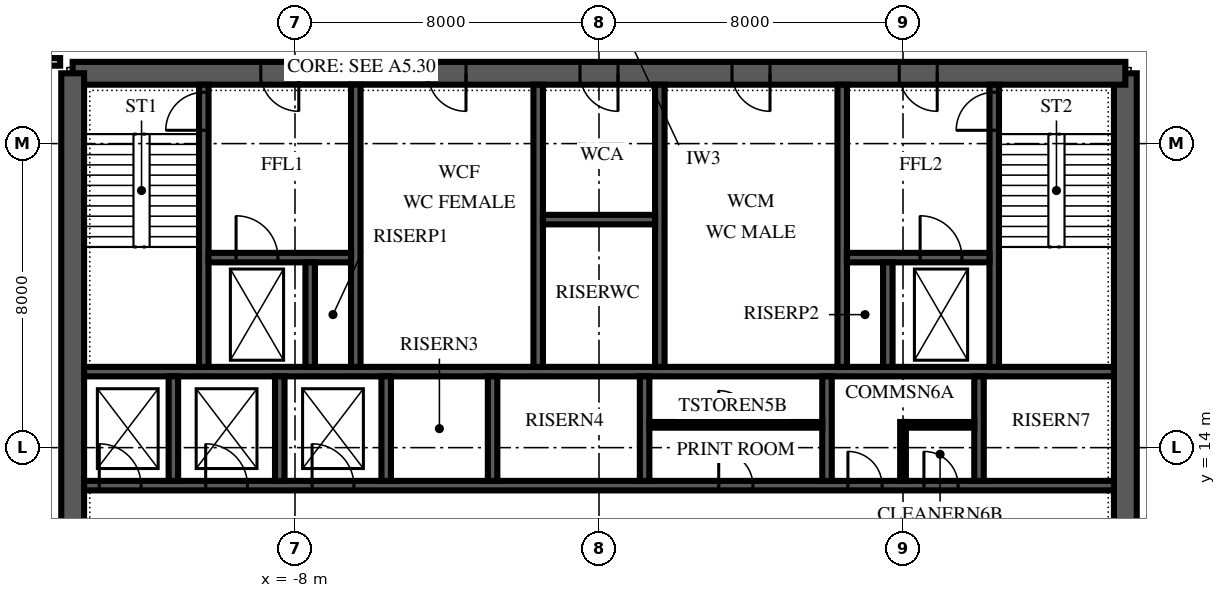
"""IFC4 building model, lengths in metres.
Left out: names, types, materials, properties, quantities, classifications, styles, units other than length and angle.
Written with IfcOpenShell. Run it as: python <this file> out.ifc"""

import sys

from ifc_helpers import new_model, si_unit, direction, frame, frame_2d, origin, place, context, subcontext, project, spatial, polyline, rectangle, outline, extrude, element, fill, save


model = new_model("IFC4")
c1 = context("Model", 3, precision=1e-05, world=origin(), true_north=direction((0.0, 1.0)))
c2 = subcontext(c1, "Body", "Model", "MODEL_VIEW")
j1 = project(units=[si_unit("LENGTHUNIT", "METRE"), si_unit("PLANEANGLEUNIT", "RADIAN")], contexts=[c1])
p1 = place(None, origin())
s1 = spatial("IfcSite", under=j1, at=p1, CompositionType="ELEMENT")
p2 = place(p1, origin())
s2 = spatial("IfcBuilding", under=s1, at=p2, CompositionType="ELEMENT")
p3 = place(p2, frame((0.0, 0.0, 214.0)))
s3 = spatial("IfcBuildingStorey", under=s2, at=p3, CompositionType="ELEMENT", Elevation=214.0)
p4 = place(p3, frame((13.85, 6.15, 0.0), z_axis=(0.0, 0.0, 1.0), x_axis=(0.0, 1.0, 0.0)))
e1 = element("IfcWall", 1, at=p4, inside=s3, PredefinedType="SHEAR", context=c2, shape_type="SweptSolid", body=[
    extrude(outline(polyline([(0.0, -0.3), (17.7, -0.3), (17.7, 0.0), (17.4, 0.0), (17.4, 0.3), (0.3, 0.3), (0.3, 0.0), (0.0, 0.0), (0.0, -0.3)])), origin(), (0.0, 0.0, 1.0), 4.0),
])
p5 = place(p4, frame((4.15, 0.0, 0.0)))
e2 = element("IfcOpeningElement", 2, at=p5, cuts=e1, PredefinedType="OPENING", context=c2, shape_type="SweptSolid", body=[
    extrude(rectangle(XDim=1.8, YDim=2.4, at=frame_2d((0.9, 1.2))), frame((0.0, 0.315, 0.0), z_axis=(0.0, -1.0, 0.0), x_axis=(1.0, 0.0, 0.0)), (0.0, 0.0, 1.0), 0.63),
])
p6 = place(p3, frame((13.85, 23.85, 0.0), z_axis=(0.0, 0.0, 1.0), x_axis=(-1.0, 0.0, 0.0)))
e3 = element("IfcWall", 3, at=p6, inside=s3, PredefinedType="SHEAR", context=c2, shape_type="SweptSolid", body=[
    extrude(rectangle(XDim=27.7, YDim=0.6, at=frame_2d((13.85, 0.0))), origin(), (0.0, 0.0, 1.0), 4.0),
])
p7 = place(p6, frame((21.75, 0.0, 0.0)))
e4 = element("IfcOpeningElement", 4, at=p7, cuts=e3, PredefinedType="OPENING", context=c2, shape_type="SweptSolid", body=[
    extrude(rectangle(XDim=1.0, YDim=2.1, at=frame_2d((0.5, 1.05))), frame((0.0, 0.315, 0.0), z_axis=(0.0, -1.0, 0.0), x_axis=(1.0, 0.0, 0.0)), (0.0, 0.0, 1.0), 0.63),
])
p8 = place(p6, frame((4.95, 0.0, 0.0)))
e5 = element("IfcOpeningElement", 5, at=p8, cuts=e3, PredefinedType="OPENING", context=c2, shape_type="SweptSolid", body=[
    extrude(rectangle(XDim=1.0, YDim=2.1, at=frame_2d((0.5, 1.05))), frame((0.0, 0.315, 0.0), z_axis=(0.0, -1.0, 0.0), x_axis=(1.0, 0.0, 0.0)), (0.0, 0.0, 1.0), 0.63),
])
p9 = place(p6, frame((17.35, 0.0, 0.0)))
e6 = element("IfcOpeningElement", 6, at=p9, cuts=e3, PredefinedType="OPENING", context=c2, shape_type="SweptSolid", body=[
    extrude(rectangle(XDim=1.0, YDim=2.1, at=frame_2d((0.5, 1.05))), frame((0.0, 0.315, 0.0), z_axis=(0.0, -1.0, 0.0), x_axis=(1.0, 0.0, 0.0)), (0.0, 0.0, 1.0), 0.63),
])
p10 = place(p6, frame((13.35, 0.0, 0.0)))
e7 = element("IfcOpeningElement", 7, at=p10, cuts=e3, PredefinedType="OPENING", context=c2, shape_type="SweptSolid", body=[
    extrude(rectangle(XDim=1.0, YDim=2.1, at=frame_2d((0.5, 1.05))), frame((0.0, 0.315, 0.0), z_axis=(0.0, -1.0, 0.0), x_axis=(1.0, 0.0, 0.0)), (0.0, 0.0, 1.0), 0.63),
])
p11 = place(p6, frame((9.35, 0.0, 0.0)))
e8 = element("IfcOpeningElement", 8, at=p11, cuts=e3, PredefinedType="OPENING", context=c2, shape_type="SweptSolid", body=[
    extrude(rectangle(XDim=1.0, YDim=2.1, at=frame_2d((0.5, 1.05))), frame((0.0, 0.315, 0.0), z_axis=(0.0, -1.0, 0.0), x_axis=(1.0, 0.0, 0.0)), (0.0, 0.0, 1.0), 0.63),
])
p12 = place(p3, frame((-13.85, 23.85, 0.0), z_axis=(0.0, 0.0, 1.0), x_axis=(0.0, -1.0, 0.0)))
e9 = element("IfcWall", 9, at=p12, inside=s3, PredefinedType="SHEAR", context=c2, shape_type="SweptSolid", body=[
    extrude(outline(polyline([(0.0, -0.3), (17.7, -0.3), (17.7, 0.0), (17.4, 0.0), (17.4, 0.3), (0.3, 0.3), (0.3, 0.0), (0.0, 0.0), (0.0, -0.3)])), origin(), (0.0, 0.0, 1.0), 4.0),
])
p13 = place(p12, frame((11.75, 0.0, 0.0)))
e10 = element("IfcOpeningElement", 10, at=p13, cuts=e9, PredefinedType="OPENING", context=c2, shape_type="SweptSolid", body=[
    extrude(rectangle(XDim=1.8, YDim=2.4, at=frame_2d((0.9, 1.2))), frame((0.0, 0.315, 0.0), z_axis=(0.0, -1.0, 0.0), x_axis=(1.0, 0.0, 0.0)), (0.0, 0.0, 1.0), 0.63),
])
p14 = place(p3, frame((-13.55, 13.0, 0.0), z_axis=(0.0, 0.0, 1.0), x_axis=(1.0, 0.0, 0.0)))
e11 = element("IfcWall", 11, at=p14, inside=s3, PredefinedType="SHEAR", context=c2, shape_type="SweptSolid", body=[
    extrude(rectangle(XDim=27.1, YDim=0.25, at=frame_2d((13.55, 0.0))), origin(), (0.0, 0.0, 1.0), 4.0),
])
p15 = place(p14, frame((0.4, 0.0, 0.0)))
e12 = element("IfcOpeningElement", 12, at=p15, cuts=e11, PredefinedType="OPENING", context=c2, shape_type="SweptSolid", body=[
    extrude(rectangle(XDim=1.1, YDim=2.1, at=frame_2d((0.55, 1.05))), frame((0.0, 0.14, 0.0), z_axis=(0.0, -1.0, 0.0), x_axis=(1.0, 0.0, 0.0)), (0.0, 0.0, 1.0), 0.28),
])
p16 = place(p14, frame((3.2, 0.0, 0.0)))
e13 = element("IfcOpeningElement", 13, at=p16, cuts=e11, PredefinedType="OPENING", context=c2, shape_type="SweptSolid", body=[
    extrude(rectangle(XDim=1.1, YDim=2.1, at=frame_2d((0.55, 1.05))), frame((0.0, 0.14, 0.0), z_axis=(0.0, -1.0, 0.0), x_axis=(1.0, 0.0, 0.0)), (0.0, 0.0, 1.0), 0.28),
])
p17 = place(p14, frame((6.0, 0.0, 0.0)))
e14 = element("IfcOpeningElement", 14, at=p17, cuts=e11, PredefinedType="OPENING", context=c2, shape_type="SweptSolid", body=[
    extrude(rectangle(XDim=1.1, YDim=2.1, at=frame_2d((0.55, 1.05))), frame((0.0, 0.14, 0.0), z_axis=(0.0, -1.0, 0.0), x_axis=(1.0, 0.0, 0.0)), (0.0, 0.0, 1.0), 0.28),
])
p18 = place(p14, frame((16.7, 0.0, 0.0)))
e15 = element("IfcOpeningElement", 15, at=p18, cuts=e11, PredefinedType="OPENING", context=c2, shape_type="SweptSolid", body=[
    extrude(rectangle(XDim=0.9, YDim=2.1, at=frame_2d((0.45, 1.05))), frame((0.0, 0.14, 0.0), z_axis=(0.0, -1.0, 0.0), x_axis=(1.0, 0.0, 0.0)), (0.0, 0.0, 1.0), 0.28),
])
p19 = place(p14, frame((20.1, 0.0, 0.0)))
e16 = element("IfcOpeningElement", 16, at=p19, cuts=e11, PredefinedType="OPENING", context=c2, shape_type="SweptSolid", body=[
    extrude(rectangle(XDim=0.9, YDim=2.1, at=frame_2d((0.45, 1.05))), frame((0.0, 0.14, 0.0), z_axis=(0.0, -1.0, 0.0), x_axis=(1.0, 0.0, 0.0)), (0.0, 0.0, 1.0), 0.28),
])
p20 = place(p14, frame((22.1, 0.0, 0.0)))
e17 = element("IfcOpeningElement", 17, at=p20, cuts=e11, PredefinedType="OPENING", context=c2, shape_type="SweptSolid", body=[
    extrude(rectangle(XDim=0.9, YDim=2.1, at=frame_2d((0.45, 1.05))), frame((0.0, 0.14, 0.0), z_axis=(0.0, -1.0, 0.0), x_axis=(1.0, 0.0, 0.0)), (0.0, 0.0, 1.0), 0.28),
])
p21 = place(p3, frame((-13.55, 16.0, 0.0), z_axis=(0.0, 0.0, 1.0), x_axis=(1.0, 0.0, 0.0)))
e18 = element("IfcWall", 18, at=p21, inside=s3, PredefinedType="SHEAR", context=c2, shape_type="SweptSolid", body=[
    extrude(rectangle(XDim=27.1, YDim=0.25, at=frame_2d((13.55, 0.0))), origin(), (0.0, 0.0, 1.0), 4.0),
])
for number, where, z_axis, x_axis in (
    (19, (-11.2, 13.125, 0.0), (0.0, 0.0, 1.0), (0.0, 1.0, 0.0)),
    (20, (-8.4, 13.125, 0.0), (0.0, 0.0, 1.0), (0.0, 1.0, 0.0)),
    (21, (-5.6, 13.125, 0.0), (0.0, 0.0, 1.0), (0.0, 1.0, 0.0)),
    (22, (-2.8, 13.125, 0.0), (0.0, 0.0, 1.0), (0.0, 1.0, 0.0)),
    (23, (1.2, 13.125, 0.0), (0.0, 0.0, 1.0), (0.0, 1.0, 0.0)),
    (24, (6.0, 13.125, 0.0), (0.0, 0.0, 1.0), (0.0, 1.0, 0.0)),
    (25, (10.0, 13.125, 0.0), (0.0, 0.0, 1.0), (0.0, 1.0, 0.0)),
):
    element("IfcWall", number, at=place(p3, frame(where, z_axis=z_axis, x_axis=x_axis)), inside=s3, PredefinedType="SHEAR", context=c2, shape_type="SweptSolid", body=[
        extrude(rectangle(XDim=2.75, YDim=0.25, at=frame_2d((1.375, 0.0))), origin(), (0.0, 0.0, 1.0), 4.0),
    ])
p22 = place(p3, frame((-10.4, 16.125, 0.0), z_axis=(0.0, 0.0, 1.0), x_axis=(0.0, 1.0, 0.0)))
e26 = element("IfcWall", 26, at=p22, inside=s3, PredefinedType="SHEAR", context=c2, shape_type="SweptSolid", body=[
    extrude(rectangle(XDim=7.425, YDim=0.25, at=frame_2d((3.712, 0.0))), origin(), (0.0, 0.0, 1.0), 4.0),
])
p23 = place(p22, frame((6.225, 0.0, 0.0)))
e27 = element("IfcOpeningElement", 27, at=p23, cuts=e26, PredefinedType="OPENING", context=c2, shape_type="SweptSolid", body=[
    extrude(rectangle(XDim=1.0, YDim=2.1, at=frame_2d((0.5, 1.05))), frame((0.0, 0.14, 0.0), z_axis=(0.0, -1.0, 0.0), x_axis=(1.0, 0.0, 0.0)), (0.0, 0.0, 1.0), 0.28),
])
for number, where, z_axis, x_axis in (
    (28, (-6.4, 16.125, 0.0), (0.0, 0.0, 1.0), (0.0, 1.0, 0.0)),
    (29, (-1.6, 16.125, 0.0), (0.0, 0.0, 1.0), (0.0, 1.0, 0.0)),
    (30, (1.6, 16.125, 0.0), (0.0, 0.0, 1.0), (0.0, 1.0, 0.0)),
    (31, (6.4, 16.125, 0.0), (0.0, 0.0, 1.0), (0.0, 1.0, 0.0)),
):
    element("IfcWall", number, at=place(p3, frame(where, z_axis=z_axis, x_axis=x_axis)), inside=s3, PredefinedType="SHEAR", context=c2, shape_type="SweptSolid", body=[
        extrude(rectangle(XDim=7.425, YDim=0.25, at=frame_2d((3.712, 0.0))), origin(), (0.0, 0.0, 1.0), 4.0),
    ])
p24 = place(p3, frame((10.4, 16.125, 0.0), z_axis=(0.0, 0.0, 1.0), x_axis=(0.0, 1.0, 0.0)))
e32 = element("IfcWall", 32, at=p24, inside=s3, PredefinedType="SHEAR", context=c2, shape_type="SweptSolid", body=[
    extrude(rectangle(XDim=7.425, YDim=0.25, at=frame_2d((3.712, 0.0))), origin(), (0.0, 0.0, 1.0), 4.0),
])
p25 = place(p24, frame((6.225, 0.0, 0.0)))
e33 = element("IfcOpeningElement", 33, at=p25, cuts=e32, PredefinedType="OPENING", context=c2, shape_type="SweptSolid", body=[
    extrude(rectangle(XDim=1.0, YDim=2.1, at=frame_2d((0.5, 1.05))), frame((0.0, 0.14, 0.0), z_axis=(0.0, -1.0, 0.0), x_axis=(1.0, 0.0, 0.0)), (0.0, 0.0, 1.0), 0.28),
])
p26 = place(p3, frame((-10.275, 19.0, 0.0), z_axis=(0.0, 0.0, 1.0), x_axis=(1.0, 0.0, 0.0)))
e34 = element("IfcWall", 34, at=p26, inside=s3, PredefinedType="SHEAR", context=c2, shape_type="SweptSolid", body=[
    extrude(rectangle(XDim=3.75, YDim=0.25, at=frame_2d((1.875, 0.0))), origin(), (0.0, 0.0, 1.0), 4.0),
])
p27 = place(p26, frame((0.725, 0.0, 0.0)))
e35 = element("IfcOpeningElement", 35, at=p27, cuts=e34, PredefinedType="OPENING", context=c2, shape_type="SweptSolid", body=[
    extrude(rectangle(XDim=1.1, YDim=2.1, at=frame_2d((0.55, 1.05))), frame((0.0, 0.14, 0.0), z_axis=(0.0, -1.0, 0.0), x_axis=(1.0, 0.0, 0.0)), (0.0, 0.0, 1.0), 0.28),
])
p28 = place(p3, frame((6.525, 19.0, 0.0), z_axis=(0.0, 0.0, 1.0), x_axis=(1.0, 0.0, 0.0)))
e36 = element("IfcWall", 36, at=p28, inside=s3, PredefinedType="SHEAR", context=c2, shape_type="SweptSolid", body=[
    extrude(rectangle(XDim=3.75, YDim=0.25, at=frame_2d((1.875, 0.0))), origin(), (0.0, 0.0, 1.0), 4.0),
])
p29 = place(p28, frame((1.925, 0.0, 0.0)))
e37 = element("IfcOpeningElement", 37, at=p29, cuts=e36, PredefinedType="OPENING", context=c2, shape_type="SweptSolid", body=[
    extrude(rectangle(XDim=1.1, YDim=2.1, at=frame_2d((0.55, 1.05))), frame((0.0, 0.14, 0.0), z_axis=(0.0, -1.0, 0.0), x_axis=(1.0, 0.0, 0.0)), (0.0, 0.0, 1.0), 0.28),
])
for number, where, z_axis, x_axis in (
    (38, (-7.6, 16.125, 0.0), (0.0, 0.0, 1.0), (0.0, 1.0, 0.0)),
    (39, (7.6, 16.125, 0.0), (0.0, 0.0, 1.0), (0.0, 1.0, 0.0)),
):
    element("IfcWall", number, at=place(p3, frame(where, z_axis=z_axis, x_axis=x_axis)), inside=s3, PredefinedType="SHEAR", context=c2, shape_type="SweptSolid", body=[
        extrude(rectangle(XDim=2.75, YDim=0.25, at=frame_2d((1.375, 0.0))), origin(), (0.0, 0.0, 1.0), 4.0),
    ])
p30 = place(p3, frame((-1.475, 20.0, 0.0), z_axis=(0.0, 0.0, 1.0), x_axis=(1.0, 0.0, 0.0)))
e40 = element("IfcWall", 40, at=p30, inside=s3, PredefinedType="SHEAR", context=c2, shape_type="SweptSolid", body=[
    extrude(rectangle(XDim=2.95, YDim=0.25, at=frame_2d((1.475, 0.0))), origin(), (0.0, 0.0, 1.0), 4.0),
])
p31 = place(p3, frame((1.325, 14.6, 0.0), z_axis=(0.0, 0.0, 1.0), x_axis=(1.0, 0.0, 0.0)))
e41 = element("IfcWall", 41, at=p31, inside=s3, PredefinedType="PARTITIONING", context=c2, shape_type="SweptSolid", body=[
    extrude(rectangle(XDim=4.55, YDim=0.15, at=frame_2d((2.275, 0.0))), origin(), (0.0, 0.0, 1.0), 3.85),
])
p32 = place(p31, frame((1.825, 0.0, 0.0)))
e42 = element("IfcOpeningElement", 42, at=p32, cuts=e41, PredefinedType="OPENING", context=c2, shape_type="SweptSolid", body=[
    extrude(rectangle(XDim=0.9, YDim=2.1, at=frame_2d((0.45, 1.05))), frame((0.0, 0.09, 0.0), z_axis=(0.0, -1.0, 0.0), x_axis=(1.0, 0.0, 0.0)), (0.0, 0.0, 1.0), 0.18),
])
p33 = place(p3, frame((8.0, 13.125, 0.0), z_axis=(0.0, 0.0, 1.0), x_axis=(0.0, 1.0, 0.0)))
e43 = element("IfcWall", 43, at=p33, inside=s3, PredefinedType="PARTITIONING", context=c2, shape_type="SweptSolid", body=[
    extrude(rectangle(XDim=1.55, YDim=0.15, at=frame_2d((0.775, 0.0))), origin(), (0.0, 0.0, 1.0), 3.85),
])
p34 = place(p3, frame((8.075, 14.6, 0.0), z_axis=(0.0, 0.0, 1.0), x_axis=(1.0, 0.0, 0.0)))
e44 = element("IfcWall", 44, at=p34, inside=s3, PredefinedType="PARTITIONING", context=c2, shape_type="SweptSolid", body=[
    extrude(rectangle(XDim=1.8, YDim=0.15, at=frame_2d((0.9, 0.0))), origin(), (0.0, 0.0, 1.0), 3.85),
])
p35 = place(p3, frame((-16.1, 24.15, 0.0), z_axis=(0.0, 0.0, 1.0), x_axis=(1.0, 0.0, 0.0)))
e45 = element("IfcWall", 45, at=p35, inside=s3, PredefinedType="PARTITIONING", context=c2, shape_type="SweptSolid", body=[
    extrude(rectangle(XDim=1.92, YDim=0.2, at=frame_2d((0.96, 0.0))), origin(), (0.0, 0.0, 1.0), 3.4),
])
p36 = place(p7, origin())
e46 = element("IfcDoor", 46, at=p36, inside=s3, OperationType="SINGLE_SWING_RIGHT", PredefinedType="DOOR", context=c2, shape_type="SweptSolid", body=[
    extrude(rectangle(XDim=1.0, YDim=2.1, at=frame_2d((0.5, 1.05))), frame((0.0, 0.3, 0.0), z_axis=(0.0, -1.0, 0.0), x_axis=(1.0, 0.0, 0.0)), (0.0, 0.0, 1.0), 0.6),
])
fill(e4, e46)
p37 = place(p8, origin())
e47 = element("IfcDoor", 47, at=p37, inside=s3, OperationType="SINGLE_SWING_RIGHT", PredefinedType="DOOR", context=c2, shape_type="SweptSolid", body=[
    extrude(rectangle(XDim=1.0, YDim=2.1, at=frame_2d((0.5, 1.05))), frame((0.0, 0.3, 0.0), z_axis=(0.0, -1.0, 0.0), x_axis=(1.0, 0.0, 0.0)), (0.0, 0.0, 1.0), 0.6),
])
fill(e5, e47)
p38 = place(p9, origin())
e48 = element("IfcDoor", 48, at=p38, inside=s3, OperationType="SINGLE_SWING_LEFT", PredefinedType="DOOR", context=c2, shape_type="SweptSolid", body=[
    extrude(rectangle(XDim=1.0, YDim=2.1, at=frame_2d((0.5, 1.05))), frame((0.0, 0.3, 0.0), z_axis=(0.0, -1.0, 0.0), x_axis=(1.0, 0.0, 0.0)), (0.0, 0.0, 1.0), 0.6),
])
fill(e6, e48)
p39 = place(p10, origin())
e49 = element("IfcDoor", 49, at=p39, inside=s3, OperationType="SINGLE_SWING_LEFT", PredefinedType="DOOR", context=c2, shape_type="SweptSolid", body=[
    extrude(rectangle(XDim=1.0, YDim=2.1, at=frame_2d((0.5, 1.05))), frame((0.0, 0.3, 0.0), z_axis=(0.0, -1.0, 0.0), x_axis=(1.0, 0.0, 0.0)), (0.0, 0.0, 1.0), 0.6),
])
fill(e7, e49)
p40 = place(p11, origin())
e50 = element("IfcDoor", 50, at=p40, inside=s3, OperationType="SINGLE_SWING_LEFT", PredefinedType="DOOR", context=c2, shape_type="SweptSolid", body=[
    extrude(rectangle(XDim=1.0, YDim=2.1, at=frame_2d((0.5, 1.05))), frame((0.0, 0.3, 0.0), z_axis=(0.0, -1.0, 0.0), x_axis=(1.0, 0.0, 0.0)), (0.0, 0.0, 1.0), 0.6),
])
fill(e8, e50)
p41 = place(p23, origin())
e51 = element("IfcDoor", 51, at=p41, inside=s3, OperationType="SINGLE_SWING_LEFT", PredefinedType="DOOR", context=c2, shape_type="SweptSolid", body=[
    extrude(rectangle(XDim=1.0, YDim=2.1, at=frame_2d((0.5, 1.05))), frame((0.0, 0.125, 0.0), z_axis=(0.0, -1.0, 0.0), x_axis=(1.0, 0.0, 0.0)), (0.0, 0.0, 1.0), 0.25),
])
fill(e27, e51)
p42 = place(p25, origin())
e52 = element("IfcDoor", 52, at=p42, inside=s3, OperationType="SINGLE_SWING_LEFT", PredefinedType="DOOR", context=c2, shape_type="SweptSolid", body=[
    extrude(rectangle(XDim=1.0, YDim=2.1, at=frame_2d((0.5, 1.05))), frame((0.0, 0.125, 0.0), z_axis=(0.0, -1.0, 0.0), x_axis=(1.0, 0.0, 0.0)), (0.0, 0.0, 1.0), 0.25),
])
fill(e33, e52)
p43 = place(p15, origin())
e53 = element("IfcDoor", 53, at=p43, inside=s3, OperationType="SLIDING_TO_LEFT", PredefinedType="DOOR", context=c2, shape_type="SweptSolid", body=[
    extrude(rectangle(XDim=1.1, YDim=2.1, at=frame_2d((0.55, 1.05))), frame((0.0, 0.125, 0.0), z_axis=(0.0, -1.0, 0.0), x_axis=(1.0, 0.0, 0.0)), (0.0, 0.0, 1.0), 0.25),
])
fill(e12, e53)
p44 = place(p16, origin())
e54 = element("IfcDoor", 54, at=p44, inside=s3, OperationType="SLIDING_TO_LEFT", PredefinedType="DOOR", context=c2, shape_type="SweptSolid", body=[
    extrude(rectangle(XDim=1.1, YDim=2.1, at=frame_2d((0.55, 1.05))), frame((0.0, 0.125, 0.0), z_axis=(0.0, -1.0, 0.0), x_axis=(1.0, 0.0, 0.0)), (0.0, 0.0, 1.0), 0.25),
])
fill(e13, e54)
p45 = place(p17, origin())
e55 = element("IfcDoor", 55, at=p45, inside=s3, OperationType="SLIDING_TO_LEFT", PredefinedType="DOOR", context=c2, shape_type="SweptSolid", body=[
    extrude(rectangle(XDim=1.1, YDim=2.1, at=frame_2d((0.55, 1.05))), frame((0.0, 0.125, 0.0), z_axis=(0.0, -1.0, 0.0), x_axis=(1.0, 0.0, 0.0)), (0.0, 0.0, 1.0), 0.25),
])
fill(e14, e55)
p46 = place(p29, origin())
e56 = element("IfcDoor", 56, at=p46, inside=s3, OperationType="SLIDING_TO_RIGHT", PredefinedType="DOOR", context=c2, shape_type="SweptSolid", body=[
    extrude(rectangle(XDim=1.1, YDim=2.1, at=frame_2d((0.55, 1.05))), frame((0.0, 0.125, 0.0), z_axis=(0.0, -1.0, 0.0), x_axis=(1.0, 0.0, 0.0)), (0.0, 0.0, 1.0), 0.25),
])
fill(e37, e56)
p47 = place(p27, origin())
e57 = element("IfcDoor", 57, at=p47, inside=s3, OperationType="SLIDING_TO_RIGHT", PredefinedType="DOOR", context=c2, shape_type="SweptSolid", body=[
    extrude(rectangle(XDim=1.1, YDim=2.1, at=frame_2d((0.55, 1.05))), frame((0.0, 0.125, 0.0), z_axis=(0.0, -1.0, 0.0), x_axis=(1.0, 0.0, 0.0)), (0.0, 0.0, 1.0), 0.25),
])
fill(e35, e57)
p48 = place(p18, origin())
e58 = element("IfcDoor", 58, at=p48, inside=s3, OperationType="SINGLE_SWING_LEFT", PredefinedType="DOOR", context=c2, shape_type="SweptSolid", body=[
    extrude(rectangle(XDim=0.9, YDim=2.1, at=frame_2d((0.45, 1.05))), frame((0.0, 0.125, 0.0), z_axis=(0.0, -1.0, 0.0), x_axis=(1.0, 0.0, 0.0)), (0.0, 0.0, 1.0), 0.25),
])
fill(e15, e58)
p49 = place(p32, origin())
e59 = element("IfcDoor", 59, at=p49, inside=s3, OperationType="SINGLE_SWING_LEFT", PredefinedType="DOOR", context=c2, shape_type="SweptSolid", body=[
    extrude(rectangle(XDim=0.9, YDim=2.1, at=frame_2d((0.45, 1.05))), frame((0.0, 0.075, 0.0), z_axis=(0.0, -1.0, 0.0), x_axis=(1.0, 0.0, 0.0)), (0.0, 0.0, 1.0), 0.149),
])
fill(e42, e59)
p50 = place(p19, origin())
e60 = element("IfcDoor", 60, at=p50, inside=s3, OperationType="SINGLE_SWING_LEFT", PredefinedType="DOOR", context=c2, shape_type="SweptSolid", body=[
    extrude(rectangle(XDim=0.9, YDim=2.1, at=frame_2d((0.45, 1.05))), frame((0.0, 0.125, 0.0), z_axis=(0.0, -1.0, 0.0), x_axis=(1.0, 0.0, 0.0)), (0.0, 0.0, 1.0), 0.25),
])
fill(e16, e60)
p51 = place(p20, origin())
e61 = element("IfcDoor", 61, at=p51, inside=s3, OperationType="SINGLE_SWING_LEFT", PredefinedType="DOOR", context=c2, shape_type="SweptSolid", body=[
    extrude(rectangle(XDim=0.9, YDim=2.1, at=frame_2d((0.45, 1.05))), frame((0.0, 0.125, 0.0), z_axis=(0.0, -1.0, 0.0), x_axis=(1.0, 0.0, 0.0)), (0.0, 0.0, 1.0), 0.25),
])
fill(e17, e61)
save(model, sys.argv[1])
